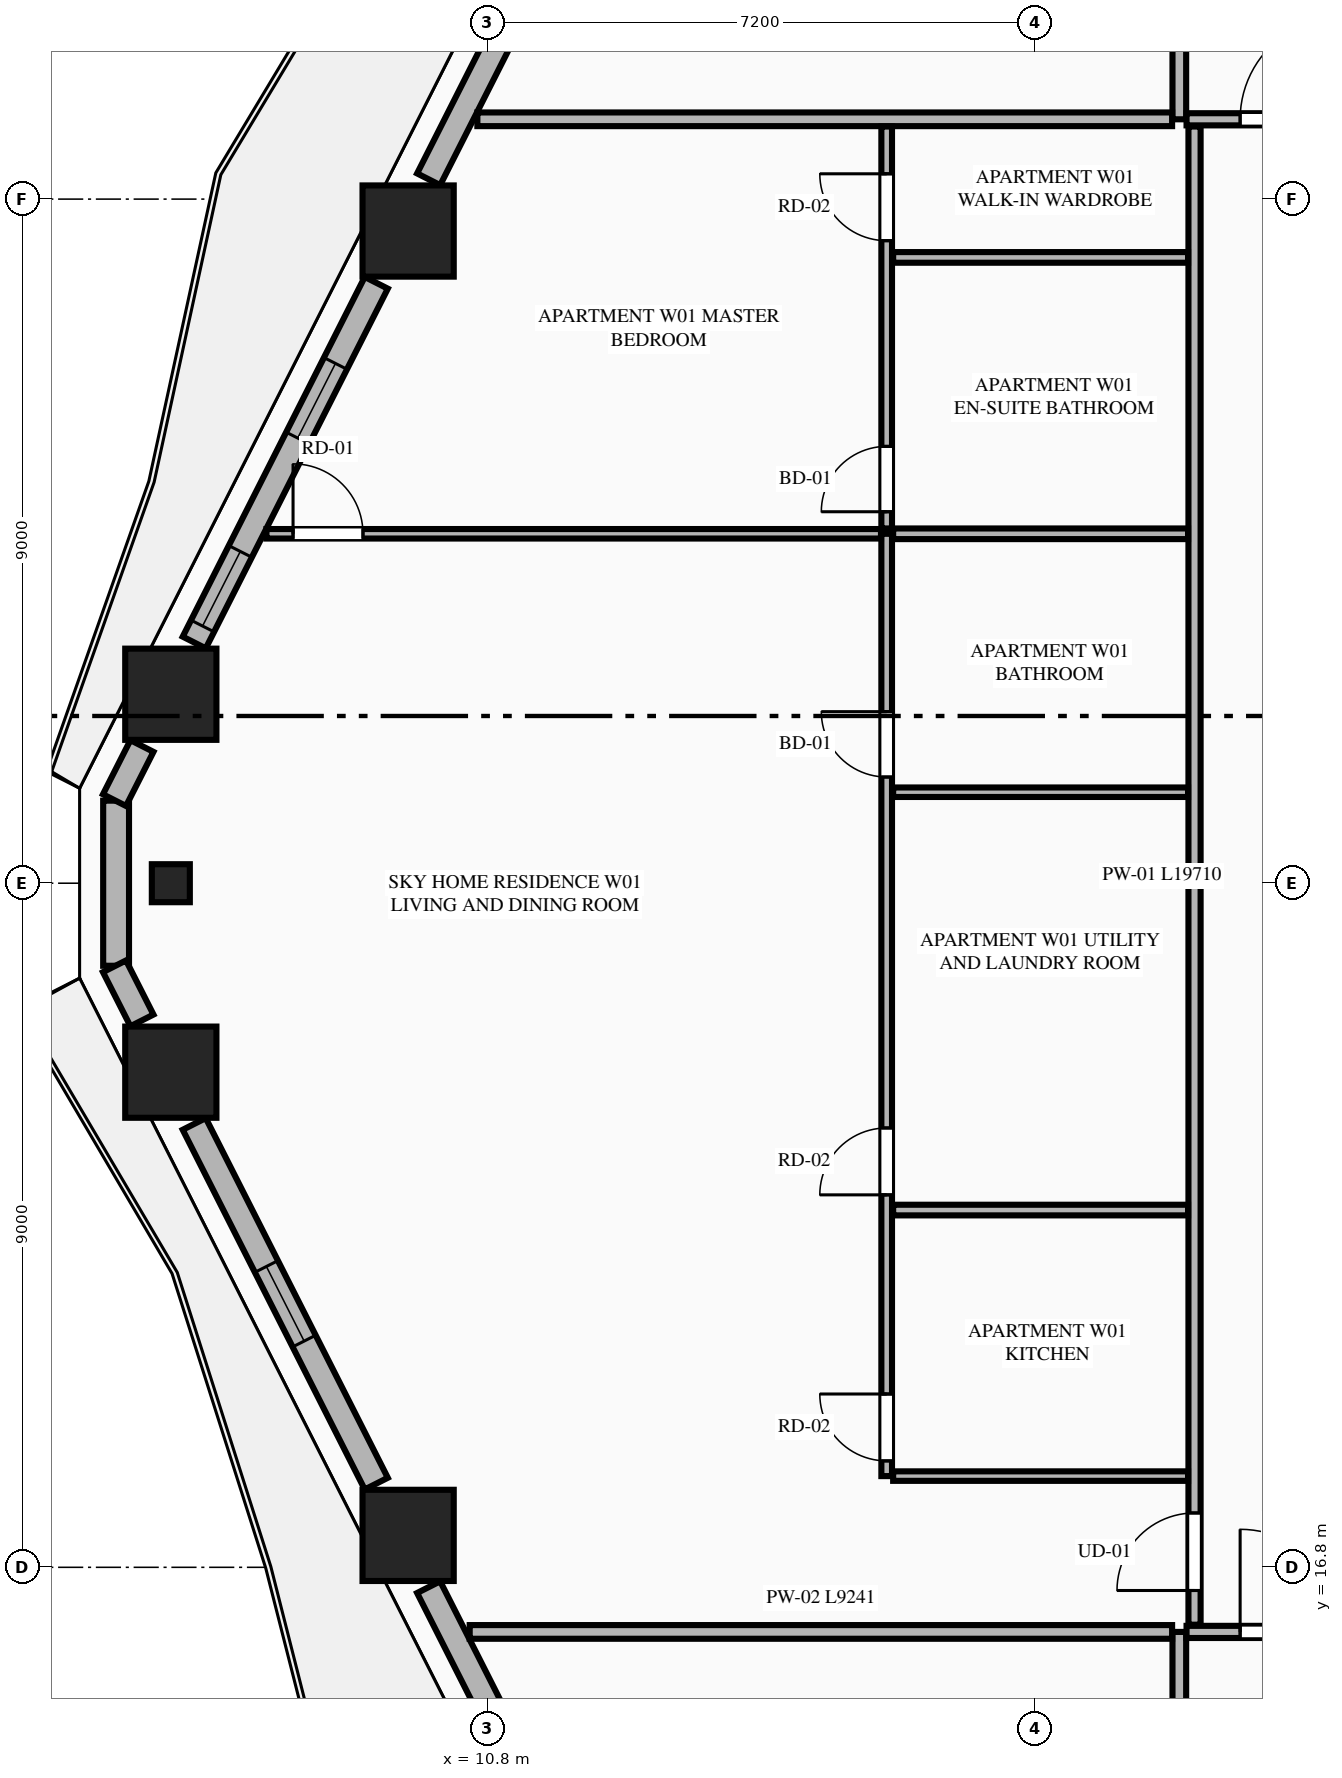
"""IFC4 building model, lengths in metres.
Left out: names, types, materials, properties, quantities, classifications, styles, units other than length and angle.
Written with IfcOpenShell. Run it as: python <this file> out.ifc"""

import sys

from ifc_helpers import new_model, si_unit, direction, frame, frame_2d, origin, origin_2d, place, context, subcontext, project, spatial, rectangle, extrude, element, fill, save


model = new_model("IFC4")
c1 = context("Model", 3, precision=1e-05, world=origin(), true_north=direction((0.0, 1.0)))
c2 = subcontext(c1, "Body", "Model", "MODEL_VIEW")
j1 = project(units=[si_unit("LENGTHUNIT", "METRE"), si_unit("PLANEANGLEUNIT", "RADIAN")], contexts=[c1])
p1 = place(None, origin())
s1 = spatial("IfcSite", under=j1, at=p1, CompositionType="ELEMENT")
p2 = place(p1, origin())
s2 = spatial("IfcBuilding", under=s1, at=p2, CompositionType="ELEMENT")
p3 = place(p2, frame((0.0, 0.0, 56.85)))
s3 = spatial("IfcBuildingStorey", under=s2, at=p3, CompositionType="ELEMENT", Elevation=56.85)
for number, where, z_axis, x_axis in (
    (1, (9.754, 34.38, 0.0), (0.0, 0.0, 1.0), (1.0, 0.0, 0.0)),
    (2, (6.632, 28.286, 0.0), (0.0, 0.0, 1.0), (1.0, 0.0, 0.0)),
    (3, (6.632, 23.314, 0.0), (0.0, 0.0, 1.0), (1.0, 0.0, 0.0)),
    (4, (9.754, 17.22, 0.0), (0.0, 0.0, 1.0), (1.0, 0.0, 0.0)),
):
    element("IfcColumn", number, at=place(p3, frame(where, z_axis=z_axis, x_axis=x_axis)), inside=s3, PredefinedType="COLUMN", context=c2, shape_type="SweptSolid", body=[
        extrude(rectangle(XDim=1.2, YDim=1.2, at=origin_2d()), origin(), (0.0, 0.0, 1.0), 3.55),
    ])
p4 = place(p3, frame((6.632, 25.8, 0.0), z_axis=(0.0, 0.0, 1.0), x_axis=(0.0, -1.0, 0.0)))
e5 = element("IfcColumn", 5, at=p4, inside=s3, PredefinedType="PILASTER", context=c2, shape_type="SweptSolid", body=[
    extrude(rectangle(XDim=0.5, YDim=0.35, at=origin_2d()), origin(), (0.0, 0.0, 1.0), 3.55),
])
p5 = place(p3, frame((5.912, 26.886, 0.0), z_axis=(0.0, 0.0, 1.0), x_axis=(0.0, -1.0, 0.0)))
e6 = element("IfcWall", 6, at=p5, inside=s3, PredefinedType="STANDARD", context=c2, shape_type="SweptSolid", body=[
    extrude(rectangle(XDim=2.172, YDim=0.34, at=frame_2d((1.086, 0.0))), origin(), (0.0, 0.0, 1.0), 3.33),
])
p6 = place(p3, frame((12.529, 40.01, 0.0), z_axis=(0.0, 0.0, 1.0), x_axis=(-0.451627137896, -0.892206774417, 0.0)))
e7 = element("IfcWall", 7, at=p6, inside=s3, PredefinedType="STANDARD", context=c2, shape_type="SweptSolid", body=[
    extrude(rectangle(XDim=5.547, YDim=0.34, at=frame_2d((2.773, 0.0))), origin(), (0.0, 0.0, 1.0), 2.787),
])
p7 = place(p6, frame((1.656, 0.0, 0.0)))
e8 = element("IfcOpeningElement", 8, at=p7, cuts=e7, PredefinedType="OPENING", context=c2, shape_type="SweptSolid", body=[
    extrude(rectangle(XDim=1.1, YDim=2.25, at=frame_2d((0.55, 1.125))), frame((0.0, 0.18, 0.0), z_axis=(0.0, -1.0, 0.0), x_axis=(1.0, 0.0, 0.0)), (0.0, 0.0, 1.0), 0.36),
])
p8 = place(p3, frame((9.335, 33.699, 0.0), z_axis=(0.0, 0.0, 1.0), x_axis=(-0.451590635984, -0.892225250422, 0.0)))
e9 = element("IfcWall", 9, at=p8, inside=s3, PredefinedType="STANDARD", context=c2, shape_type="SweptSolid", body=[
    extrude(rectangle(XDim=5.303, YDim=0.34, at=frame_2d((2.652, 0.0))), origin(), (0.0, 0.0, 1.0), 2.787),
])
p9 = place(p8, frame((1.189, 0.0, 0.75)))
e10 = element("IfcOpeningElement", 10, at=p9, cuts=e9, PredefinedType="OPENING", context=c2, shape_type="SweptSolid", body=[
    extrude(rectangle(XDim=1.1, YDim=1.887, at=frame_2d((0.55, 0.943))), frame((0.0, 0.18, 0.0), z_axis=(0.0, -1.0, 0.0), x_axis=(1.0, 0.0, 0.0)), (0.0, 0.0, 1.0), 0.36),
])
p10 = place(p8, frame((3.961, 0.0, 0.75)))
e11 = element("IfcOpeningElement", 11, at=p10, cuts=e9, PredefinedType="OPENING", context=c2, shape_type="SweptSolid", body=[
    extrude(rectangle(XDim=1.1, YDim=1.887, at=frame_2d((0.55, 0.943))), frame((0.0, 0.18, 0.0), z_axis=(0.0, -1.0, 0.0), x_axis=(1.0, 0.0, 0.0)), (0.0, 0.0, 1.0), 0.36),
])
for number, where, z_axis, x_axis in (
    (12, (6.252, 27.605, 0.0), (0.0, 0.0, 1.0), (-0.452, -0.892, 0.0)),
    (13, (5.891, 24.707, 0.0), (0.0, 0.0, 1.0), (0.452, -0.892, 0.0)),
):
    element("IfcWall", number, at=place(p3, frame(where, z_axis=z_axis, x_axis=x_axis)), inside=s3, PredefinedType="STANDARD", context=c2, shape_type="SweptSolid", body=[
        extrude(rectangle(XDim=0.798, YDim=0.34, at=frame_2d((0.399, 0.0))), origin(), (0.0, 0.0, 1.0), 3.33),
    ])
p11 = place(p3, frame((6.94, 22.633, 0.0), z_axis=(0.0, 0.0, 1.0), x_axis=(0.451572088722, -0.892234637686, 0.0)))
e14 = element("IfcWall", 14, at=p11, inside=s3, PredefinedType="STANDARD", context=c2, shape_type="SweptSolid", body=[
    extrude(rectangle(XDim=5.304, YDim=0.34, at=frame_2d((2.652, 0.0))), origin(), (0.0, 0.0, 1.0), 2.787),
])
p12 = place(p11, frame((2.102, 0.0, 0.75)))
e15 = element("IfcOpeningElement", 15, at=p12, cuts=e14, PredefinedType="OPENING", context=c2, shape_type="SweptSolid", body=[
    extrude(rectangle(XDim=1.1, YDim=1.887, at=frame_2d((0.55, 0.943))), frame((0.0, 0.18, 0.0), z_axis=(0.0, -1.0, 0.0), x_axis=(1.0, 0.0, 0.0)), (0.0, 0.0, 1.0), 0.36),
])
p13 = place(p3, frame((10.024, 16.539, 0.0), z_axis=(0.0, 0.0, 1.0), x_axis=(0.451627137896, -0.892206774417, 0.0)))
e16 = element("IfcWall", 16, at=p13, inside=s3, PredefinedType="STANDARD", context=c2, shape_type="SweptSolid", body=[
    extrude(rectangle(XDim=5.547, YDim=0.34, at=frame_2d((2.773, 0.0))), origin(), (0.0, 0.0, 1.0), 2.787),
])
p14 = place(p13, frame((2.679, 0.0, 0.0)))
e17 = element("IfcOpeningElement", 17, at=p14, cuts=e16, PredefinedType="OPENING", context=c2, shape_type="SweptSolid", body=[
    extrude(rectangle(XDim=1.1, YDim=2.25, at=frame_2d((0.55, 1.125))), frame((0.0, 0.18, 0.0), z_axis=(0.0, -1.0, 0.0), x_axis=(1.0, 0.0, 0.0)), (0.0, 0.0, 1.0), 0.36),
])
p15 = place(p3, frame((19.9, 2.455, 0.0), z_axis=(0.0, 0.0, 1.0), x_axis=(0.0, 1.0, 0.0)))
e18 = element("IfcWall", 18, at=p15, inside=s3, PredefinedType="PARTITIONING", context=c2, shape_type="SweptSolid", body=[
    extrude(rectangle(XDim=13.495, YDim=0.18, at=frame_2d((6.748, 0.0))), origin(), (0.0, 0.0, 1.0), 3.33),
])
p16 = place(p3, frame((19.995, 15.95, 0.0), z_axis=(0.0, 0.0, 1.0), x_axis=(1.0, 0.0, 0.0)))
e19 = element("IfcWall", 19, at=p16, inside=s3, PredefinedType="PARTITIONING", context=c2, shape_type="SweptSolid", body=[
    extrude(rectangle(XDim=16.432, YDim=0.16, at=frame_2d((8.216, 0.0))), origin(), (0.0, 0.0, 1.0), 3.33),
])
p17 = place(p16, frame((0.705, 0.0, 0.0)))
e20 = element("IfcOpeningElement", 20, at=p17, cuts=e19, PredefinedType="OPENING", context=c2, shape_type="SweptSolid", body=[
    extrude(rectangle(XDim=1.35, YDim=2.35, at=frame_2d((0.675, 1.175))), frame((0.0, 0.09, 0.0), z_axis=(0.0, -1.0, 0.0), x_axis=(1.0, 0.0, 0.0)), (0.0, 0.0, 1.0), 0.18),
])
p18 = place(p3, frame((19.9, 35.85, 0.0), z_axis=(0.0, 0.0, 1.0), x_axis=(0.0, 1.0, 0.0)))
e21 = element("IfcWall", 21, at=p18, inside=s3, PredefinedType="PARTITIONING", context=c2, shape_type="SweptSolid", body=[
    extrude(rectangle(XDim=13.295, YDim=0.18, at=frame_2d((6.647, 0.0))), origin(), (0.0, 0.0, 1.0), 3.33),
])
p19 = place(p3, frame((19.995, 35.85, 0.0), z_axis=(0.0, 0.0, 1.0), x_axis=(1.0, 0.0, 0.0)))
e22 = element("IfcWall", 22, at=p19, inside=s3, PredefinedType="PARTITIONING", context=c2, shape_type="SweptSolid", body=[
    extrude(rectangle(XDim=16.432, YDim=0.16, at=frame_2d((8.216, 0.0))), origin(), (0.0, 0.0, 1.0), 3.33),
])
p20 = place(p19, frame((0.705, 0.0, 0.0)))
e23 = element("IfcOpeningElement", 23, at=p20, cuts=e22, PredefinedType="OPENING", context=c2, shape_type="SweptSolid", body=[
    extrude(rectangle(XDim=1.35, YDim=2.35, at=frame_2d((0.675, 1.175))), frame((0.0, 0.09, 0.0), z_axis=(0.0, -1.0, 0.0), x_axis=(1.0, 0.0, 0.0)), (0.0, 0.0, 1.0), 0.18),
])
p21 = place(p3, frame((10.564, 15.95, 0.0), z_axis=(0.0, 0.0, 1.0), x_axis=(1.0, 0.0, 0.0)))
e24 = element("IfcWall", 24, at=p21, inside=s3, PredefinedType="PARTITIONING", context=c2, shape_type="SweptSolid", body=[
    extrude(rectangle(XDim=9.241, YDim=0.18, at=frame_2d((4.621, 0.0))), origin(), (0.0, 0.0, 1.0), 3.33),
])
p22 = place(p3, frame((10.665, 35.85, 0.0), z_axis=(0.0, 0.0, 1.0), x_axis=(1.0, 0.0, 0.0)))
e25 = element("IfcWall", 25, at=p22, inside=s3, PredefinedType="PARTITIONING", context=c2, shape_type="SweptSolid", body=[
    extrude(rectangle(XDim=9.14, YDim=0.18, at=frame_2d((4.57, 0.0))), origin(), (0.0, 0.0, 1.0), 3.33),
])
p23 = place(p3, frame((20.1, 16.045, 0.0), z_axis=(0.0, 0.0, 1.0), x_axis=(0.0, 1.0, 0.0)))
e26 = element("IfcWall", 26, at=p23, inside=s3, PredefinedType="PARTITIONING", context=c2, shape_type="SweptSolid", body=[
    extrude(rectangle(XDim=19.71, YDim=0.16, at=frame_2d((9.855, 0.0))), origin(), (0.0, 0.0, 1.0), 2.7),
])
p24 = place(p23, frame((0.45, 0.0, 0.0)))
e27 = element("IfcOpeningElement", 27, at=p24, cuts=e26, PredefinedType="OPENING", context=c2, shape_type="SweptSolid", body=[
    extrude(rectangle(XDim=1.02, YDim=2.25, at=frame_2d((0.51, 1.125))), frame((0.0, 0.09, 0.0), z_axis=(0.0, -1.0, 0.0), x_axis=(1.0, 0.0, 0.0)), (0.0, 0.0, 1.0), 0.18),
])
p25 = place(p3, frame((16.135, 18.0, 0.0), z_axis=(0.0, 0.0, 1.0), x_axis=(1.0, 0.0, 0.0)))
e28 = element("IfcWall", 28, at=p25, inside=s3, PredefinedType="PARTITIONING", context=c2, shape_type="SweptSolid", body=[
    extrude(rectangle(XDim=3.88, YDim=0.125, at=frame_2d((1.94, 0.0))), origin(), (0.0, 0.0, 1.0), 2.7),
])
p26 = place(p3, frame((16.05, 18.0, 0.0), z_axis=(0.0, 0.0, 1.0), x_axis=(0.0, 1.0, 0.0)))
e29 = element("IfcWall", 29, at=p26, inside=s3, PredefinedType="PLUMBINGWALL", context=c2, shape_type="SweptSolid", body=[
    extrude(rectangle(XDim=12.397, YDim=0.14, at=frame_2d((6.198, 0.0))), origin(), (0.0, 0.0, 1.0), 3.33),
])
p27 = place(p26, frame((0.2, 0.0, 0.0)))
e30 = element("IfcOpeningElement", 30, at=p27, cuts=e29, PredefinedType="OPENING", context=c2, shape_type="SweptSolid", body=[
    extrude(rectangle(XDim=0.88, YDim=2.15, at=frame_2d((0.44, 1.075))), frame((0.0, 0.08, 0.0), z_axis=(0.0, -1.0, 0.0), x_axis=(1.0, 0.0, 0.0)), (0.0, 0.0, 1.0), 0.16),
])
p28 = place(p26, frame((3.7, 0.0, 0.0)))
e31 = element("IfcOpeningElement", 31, at=p28, cuts=e29, PredefinedType="OPENING", context=c2, shape_type="SweptSolid", body=[
    extrude(rectangle(XDim=0.88, YDim=2.15, at=frame_2d((0.44, 1.075))), frame((0.0, 0.08, 0.0), z_axis=(0.0, -1.0, 0.0), x_axis=(1.0, 0.0, 0.0)), (0.0, 0.0, 1.0), 0.16),
])
p29 = place(p26, frame((9.197, 0.0, 0.0)))
e32 = element("IfcOpeningElement", 32, at=p29, cuts=e29, PredefinedType="OPENING", context=c2, shape_type="SweptSolid", body=[
    extrude(rectangle(XDim=0.86, YDim=2.1, at=frame_2d((0.43, 1.05))), frame((0.0, 0.08, 0.0), z_axis=(0.0, -1.0, 0.0), x_axis=(1.0, 0.0, 0.0)), (0.0, 0.0, 1.0), 0.16),
])
p30 = place(p3, frame((16.05, 30.467, 0.0), z_axis=(0.0, 0.0, 1.0), x_axis=(0.0, 1.0, 0.0)))
e33 = element("IfcWall", 33, at=p30, inside=s3, PredefinedType="PLUMBINGWALL", context=c2, shape_type="SweptSolid", body=[
    extrude(rectangle(XDim=5.288, YDim=0.14, at=frame_2d((2.644, 0.0))), origin(), (0.0, 0.0, 1.0), 3.33),
])
p31 = place(p30, frame((0.22, 0.0, 0.0)))
e34 = element("IfcOpeningElement", 34, at=p31, cuts=e33, PredefinedType="OPENING", context=c2, shape_type="SweptSolid", body=[
    extrude(rectangle(XDim=0.86, YDim=2.1, at=frame_2d((0.43, 1.05))), frame((0.0, 0.08, 0.0), z_axis=(0.0, -1.0, 0.0), x_axis=(1.0, 0.0, 0.0)), (0.0, 0.0, 1.0), 0.16),
])
p32 = place(p30, frame((3.786, 0.0, 0.0)))
e35 = element("IfcOpeningElement", 35, at=p32, cuts=e33, PredefinedType="OPENING", context=c2, shape_type="SweptSolid", body=[
    extrude(rectangle(XDim=0.88, YDim=2.15, at=frame_2d((0.44, 1.075))), frame((0.0, 0.08, 0.0), z_axis=(0.0, -1.0, 0.0), x_axis=(1.0, 0.0, 0.0)), (0.0, 0.0, 1.0), 0.16),
])
p33 = place(p3, frame((16.135, 30.397, 0.0), z_axis=(0.0, 0.0, 1.0), x_axis=(1.0, 0.0, 0.0)))
e36 = element("IfcWall", 36, at=p33, inside=s3, PredefinedType="PLUMBINGWALL", context=c2, shape_type="SweptSolid", body=[
    extrude(rectangle(XDim=3.88, YDim=0.14, at=frame_2d((1.94, 0.0))), origin(), (0.0, 0.0, 1.0), 3.33),
])
p34 = place(p3, frame((7.89, 30.397, 0.0), z_axis=(0.0, 0.0, 1.0), x_axis=(1.0, 0.0, 0.0)))
e37 = element("IfcWall", 37, at=p34, inside=s3, PredefinedType="PARTITIONING", context=c2, shape_type="SweptSolid", body=[
    extrude(rectangle(XDim=8.085, YDim=0.125, at=frame_2d((4.042, 0.0))), origin(), (0.0, 0.0, 1.0), 3.33),
])
p35 = place(p34, frame((0.35, 0.0, 0.0)))
e38 = element("IfcOpeningElement", 38, at=p35, cuts=e37, PredefinedType="OPENING", context=c2, shape_type="SweptSolid", body=[
    extrude(rectangle(XDim=0.92, YDim=2.15, at=frame_2d((0.46, 1.075))), frame((0.0, 0.073, 0.0), z_axis=(0.0, -1.0, 0.0), x_axis=(1.0, 0.0, 0.0)), (0.0, 0.0, 1.0), 0.145),
])
p36 = place(p3, frame((16.135, 21.5, 0.0), z_axis=(0.0, 0.0, 1.0), x_axis=(1.0, 0.0, 0.0)))
e39 = element("IfcWall", 39, at=p36, inside=s3, PredefinedType="PLUMBINGWALL", context=c2, shape_type="SweptSolid", body=[
    extrude(rectangle(XDim=3.88, YDim=0.14, at=frame_2d((1.94, 0.0))), origin(), (0.0, 0.0, 1.0), 3.33),
])
p37 = place(p3, frame((16.135, 26.997, 0.0), z_axis=(0.0, 0.0, 1.0), x_axis=(1.0, 0.0, 0.0)))
e40 = element("IfcWall", 40, at=p37, inside=s3, PredefinedType="PARTITIONING", context=c2, shape_type="SweptSolid", body=[
    extrude(rectangle(XDim=3.88, YDim=0.125, at=frame_2d((1.94, 0.0))), origin(), (0.0, 0.0, 1.0), 3.33),
])
p38 = place(p3, frame((16.135, 34.033, 0.0), z_axis=(0.0, 0.0, 1.0), x_axis=(1.0, 0.0, 0.0)))
e41 = element("IfcWall", 41, at=p38, inside=s3, PredefinedType="PLUMBINGWALL", context=c2, shape_type="SweptSolid", body=[
    extrude(rectangle(XDim=3.88, YDim=0.14, at=frame_2d((1.94, 0.0))), origin(), (0.0, 0.0, 1.0), 2.7),
])
p39 = place(p9, origin())
e42 = element("IfcWindow", 42, at=p39, inside=s3, PartitioningType="SINGLE_PANEL", PredefinedType="WINDOW", context=c2, shape_type="SweptSolid", body=[
    extrude(rectangle(XDim=1.1, YDim=1.887, at=frame_2d((0.55, 0.943))), frame((0.0, 0.03, 0.0), z_axis=(0.0, -1.0, 0.0), x_axis=(1.0, 0.0, 0.0)), (0.0, 0.0, 1.0), 0.06),
])
fill(e10, e42)
p40 = place(p12, origin())
e43 = element("IfcWindow", 43, at=p40, inside=s3, PartitioningType="SINGLE_PANEL", PredefinedType="WINDOW", context=c2, shape_type="SweptSolid", body=[
    extrude(rectangle(XDim=1.1, YDim=1.887, at=frame_2d((0.55, 0.943))), frame((0.0, 0.03, 0.0), z_axis=(0.0, -1.0, 0.0), x_axis=(1.0, 0.0, 0.0)), (0.0, 0.0, 1.0), 0.06),
])
fill(e15, e43)
p41 = place(p17, origin())
e44 = element("IfcDoor", 44, at=p41, inside=s3, OperationType="SINGLE_SWING_LEFT", PredefinedType="DOOR", context=c2, shape_type="SweptSolid", body=[
    extrude(rectangle(XDim=1.35, YDim=2.35, at=frame_2d((0.675, 1.175))), frame((0.0, 0.025, 0.0), z_axis=(0.0, -1.0, 0.0), x_axis=(1.0, 0.0, 0.0)), (0.0, 0.0, 1.0), 0.05),
])
fill(e20, e44)
p42 = place(p20, origin())
e45 = element("IfcDoor", 45, at=p42, inside=s3, OperationType="SINGLE_SWING_RIGHT", PredefinedType="DOOR", context=c2, shape_type="SweptSolid", body=[
    extrude(rectangle(XDim=1.35, YDim=2.35, at=frame_2d((0.675, 1.175))), frame((0.0, 0.025, 0.0), z_axis=(0.0, -1.0, 0.0), x_axis=(1.0, 0.0, 0.0)), (0.0, 0.0, 1.0), 0.05),
])
fill(e23, e45)
p43 = place(p27, origin())
e46 = element("IfcDoor", 46, at=p43, inside=s3, OperationType="SINGLE_SWING_RIGHT", PredefinedType="DOOR", context=c2, shape_type="SweptSolid", body=[
    extrude(rectangle(XDim=0.88, YDim=2.15, at=frame_2d((0.44, 1.075))), frame((0.0, 0.025, 0.0), z_axis=(0.0, -1.0, 0.0), x_axis=(1.0, 0.0, 0.0)), (0.0, 0.0, 1.0), 0.05),
])
fill(e30, e46)
p44 = place(p28, origin())
e47 = element("IfcDoor", 47, at=p44, inside=s3, OperationType="SINGLE_SWING_LEFT", PredefinedType="DOOR", context=c2, shape_type="SweptSolid", body=[
    extrude(rectangle(XDim=0.88, YDim=2.15, at=frame_2d((0.44, 1.075))), frame((0.0, 0.025, 0.0), z_axis=(0.0, -1.0, 0.0), x_axis=(1.0, 0.0, 0.0)), (0.0, 0.0, 1.0), 0.05),
])
fill(e31, e47)
p45 = place(p29, origin())
e48 = element("IfcDoor", 48, at=p45, inside=s3, OperationType="SINGLE_SWING_RIGHT", PredefinedType="DOOR", context=c2, shape_type="SweptSolid", body=[
    extrude(rectangle(XDim=0.86, YDim=2.1, at=frame_2d((0.43, 1.05))), frame((0.0, 0.025, 0.0), z_axis=(0.0, -1.0, 0.0), x_axis=(1.0, 0.0, 0.0)), (0.0, 0.0, 1.0), 0.05),
])
fill(e32, e48)
p46 = place(p31, origin())
e49 = element("IfcDoor", 49, at=p46, inside=s3, OperationType="SINGLE_SWING_LEFT", PredefinedType="DOOR", context=c2, shape_type="SweptSolid", body=[
    extrude(rectangle(XDim=0.86, YDim=2.1, at=frame_2d((0.43, 1.05))), frame((0.0, 0.025, 0.0), z_axis=(0.0, -1.0, 0.0), x_axis=(1.0, 0.0, 0.0)), (0.0, 0.0, 1.0), 0.05),
])
fill(e34, e49)
p47 = place(p32, origin())
e50 = element("IfcDoor", 50, at=p47, inside=s3, OperationType="SINGLE_SWING_RIGHT", PredefinedType="DOOR", context=c2, shape_type="SweptSolid", body=[
    extrude(rectangle(XDim=0.88, YDim=2.15, at=frame_2d((0.44, 1.075))), frame((0.0, 0.025, 0.0), z_axis=(0.0, -1.0, 0.0), x_axis=(1.0, 0.0, 0.0)), (0.0, 0.0, 1.0), 0.05),
])
fill(e35, e50)
p48 = place(p24, origin())
e51 = element("IfcDoor", 51, at=p48, inside=s3, OperationType="SINGLE_SWING_LEFT", PredefinedType="DOOR", context=c2, shape_type="SweptSolid", body=[
    extrude(rectangle(XDim=1.02, YDim=2.25, at=frame_2d((0.51, 1.125))), frame((0.0, 0.025, 0.0), z_axis=(0.0, -1.0, 0.0), x_axis=(1.0, 0.0, 0.0)), (0.0, 0.0, 1.0), 0.05),
])
fill(e27, e51)
p49 = place(p35, origin())
e52 = element("IfcDoor", 52, at=p49, inside=s3, OperationType="SINGLE_SWING_LEFT", PredefinedType="DOOR", context=c2, shape_type="SweptSolid", body=[
    extrude(rectangle(XDim=0.92, YDim=2.15, at=frame_2d((0.46, 1.075))), frame((0.0, 0.025, 0.0), z_axis=(0.0, -1.0, 0.0), x_axis=(1.0, 0.0, 0.0)), (0.0, 0.0, 1.0), 0.05),
])
fill(e38, e52)
p50 = place(p10, origin())
e53 = element("IfcWindow", 53, at=p50, inside=s3, PartitioningType="SINGLE_PANEL", PredefinedType="WINDOW", context=c2, shape_type="SweptSolid", body=[
    extrude(rectangle(XDim=1.1, YDim=1.887, at=frame_2d((0.55, 0.943))), frame((0.0, 0.03, 0.0), z_axis=(0.0, -1.0, 0.0), x_axis=(1.0, 0.0, 0.0)), (0.0, 0.0, 1.0), 0.06),
])
fill(e11, e53)
save(model, sys.argv[1])
